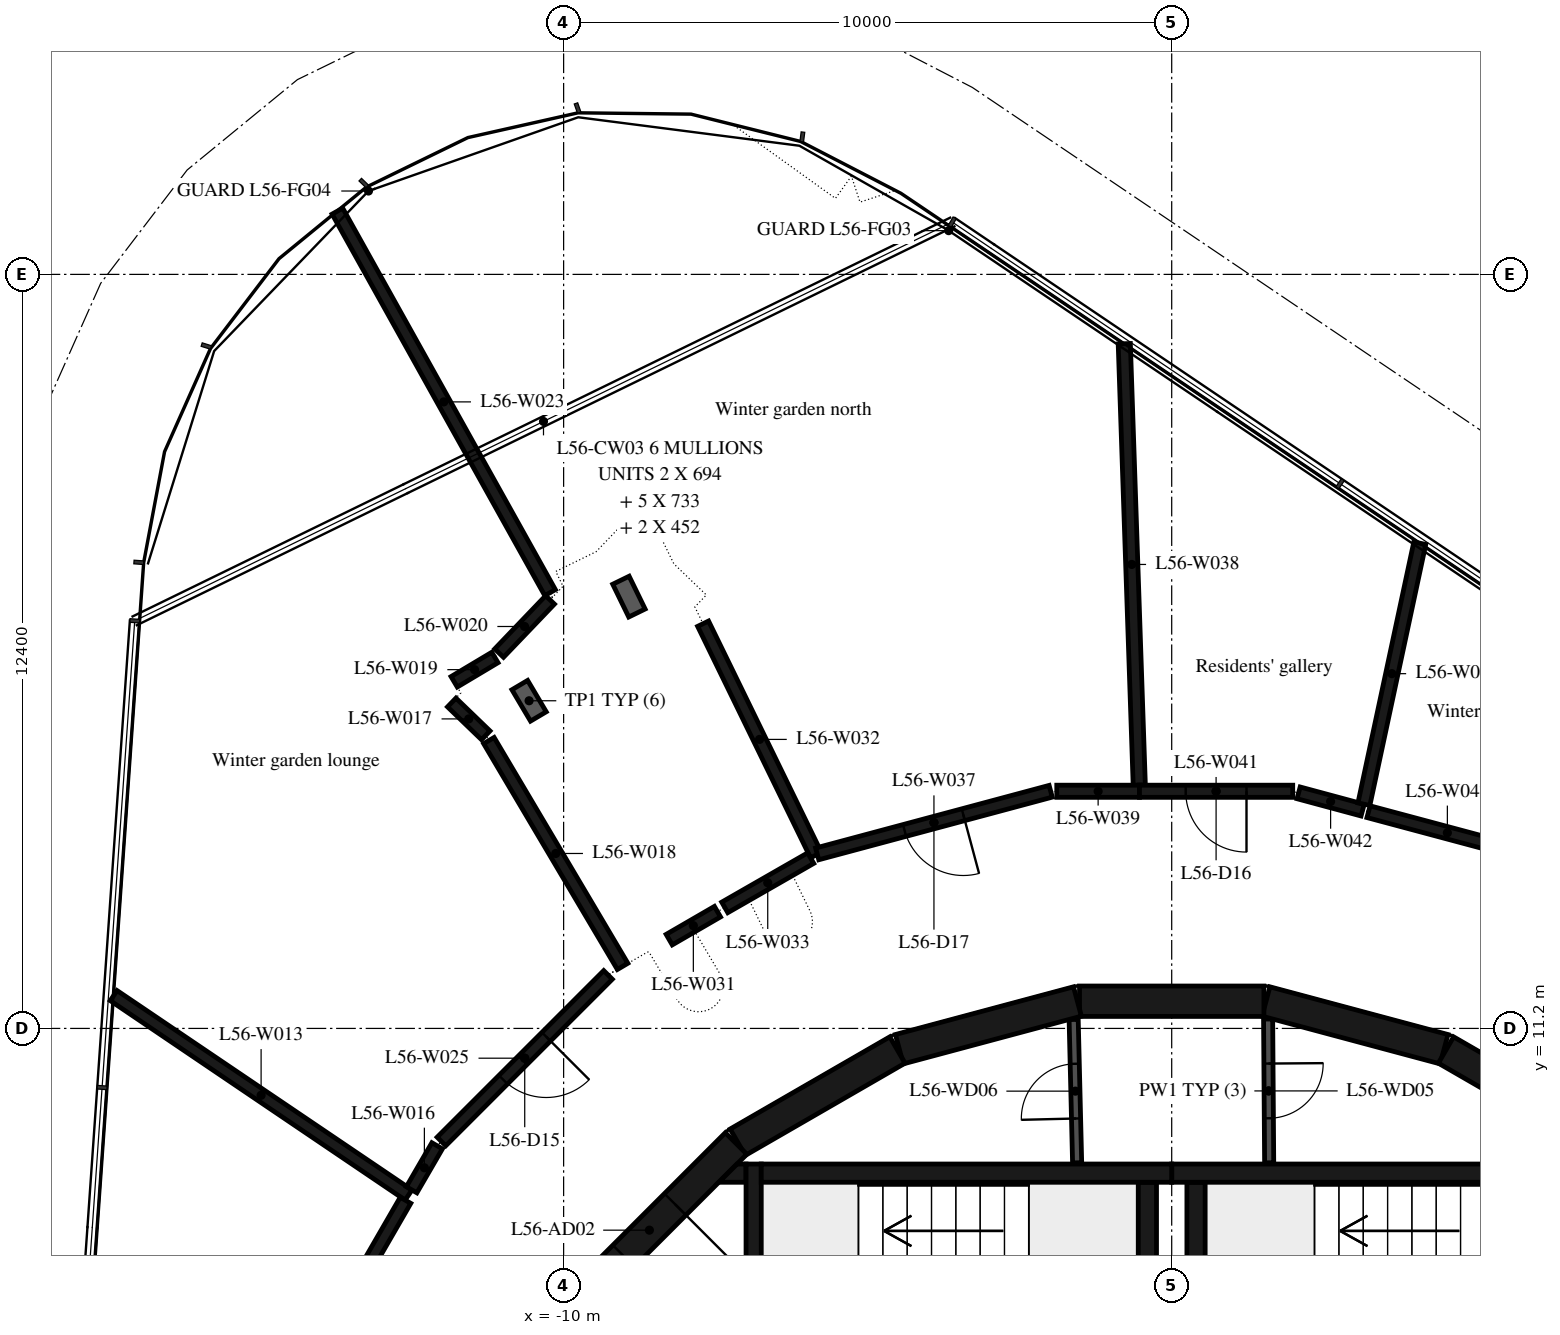
"""IFC4 building model, lengths in metres.
Left out: names, types, materials, properties, quantities, classifications, styles, units other than length and angle.
Written with IfcOpenShell. Run it as: python <this file> out.ifc"""

import sys

from ifc_helpers import new_model, si_unit, direction, frame, frame_2d, origin, place, context, subcontext, project, spatial, polyline, rectangle, outline, extrude, element, fill, save


model = new_model("IFC4")
c1 = context("Model", 3, precision=1e-05, world=origin(), true_north=direction((0.0, 1.0)))
c2 = subcontext(c1, "Body", "Model", "MODEL_VIEW")
j1 = project(units=[si_unit("LENGTHUNIT", "METRE"), si_unit("PLANEANGLEUNIT", "RADIAN")], contexts=[c1])
p1 = place(None, origin())
s1 = spatial("IfcSite", under=j1, at=p1, CompositionType="ELEMENT")
p2 = place(p1, origin())
s2 = spatial("IfcBuilding", under=s1, at=p2, CompositionType="ELEMENT")
p3 = place(p2, frame((0.0, 0.0, 219.9)))
s3 = spatial("IfcBuildingStorey", under=s2, at=p3, CompositionType="ELEMENT", Elevation=219.9)
p4 = place(p3, frame((7.137, 9.329, 0.0), z_axis=(0.0, 0.0, 1.0), x_axis=(-0.865975092491, 0.500087131594, 0.0)))
e1 = element("IfcWall", 1, at=p4, inside=s3, PredefinedType="SHEAR", context=c2, shape_type="SweptSolid", body=[
    extrude(rectangle(XDim=3.033, YDim=0.5, at=frame_2d((1.516, 0.0))), origin(), (0.0, 0.0, 1.0), 6.35),
])
p5 = place(p4, frame((1.066, 0.0, 0.0)))
e2 = element("IfcOpeningElement", 2, at=p5, cuts=e1, PredefinedType="OPENING", context=c2, shape_type="SweptSolid", body=[
    extrude(rectangle(XDim=0.9, YDim=2.1, at=frame_2d((0.45, 1.05))), frame((0.0, 0.26, 0.0), z_axis=(0.0, -1.0, 0.0), x_axis=(1.0, 0.0, 0.0)), (0.0, 0.0, 1.0), 0.52),
])
for number, where, z_axis, x_axis in (
    (3, (4.479, 10.858, 0.0), (0.0, 0.0, 1.0), (-0.966, 0.259, 0.0)),
    (4, (1.516, 11.647, 0.0), (0.0, 0.0, 1.0), (-1.0, 0.0, 0.0)),
    (5, (-1.55, 11.643, 0.0), (0.0, 0.0, 1.0), (-0.966, -0.259, 0.0)),
    (6, (-4.51, 10.845, 0.0), (0.0, 0.0, 1.0), (-0.866, -0.5, 0.0)),
):
    element("IfcWall", number, at=place(p3, frame(where, z_axis=z_axis, x_axis=x_axis)), inside=s3, PredefinedType="SHEAR", context=c2, shape_type="SweptSolid", body=[
        extrude(rectangle(XDim=3.033, YDim=0.5, at=frame_2d((1.516, 0.0))), origin(), (0.0, 0.0, 1.0), 6.35),
    ])
p6 = place(p3, frame((-7.164, 9.308, 0.0), z_axis=(0.0, 0.0, 1.0), x_axis=(-0.707106781187, -0.707106781187, 0.0)))
e7 = element("IfcWall", 7, at=p6, inside=s3, PredefinedType="SHEAR", context=c2, shape_type="SweptSolid", body=[
    extrude(rectangle(XDim=3.032, YDim=0.5, at=frame_2d((1.516, 0.0))), origin(), (0.0, 0.0, 1.0), 6.35),
])
p7 = place(p6, frame((1.416, 0.0, 0.0)))
e8 = element("IfcOpeningElement", 8, at=p7, cuts=e7, PredefinedType="OPENING", context=c2, shape_type="SweptSolid", body=[
    extrude(rectangle(XDim=1.2, YDim=2.1, at=frame_2d((0.6, 1.05))), frame((0.0, 0.26, 0.0), z_axis=(0.0, -1.0, 0.0), x_axis=(1.0, 0.0, 0.0)), (0.0, 0.0, 1.0), 0.52),
])
p8 = place(p3, frame((0.0, 8.82, 0.0), z_axis=(0.0, 0.0, 1.0), x_axis=(1.0, 0.0, 0.0)))
e9 = element("IfcWall", 9, at=p8, inside=s3, PredefinedType="SHEAR", context=c2, shape_type="SweptSolid", body=[
    extrude(rectangle(XDim=6.75, YDim=0.3, at=frame_2d((3.375, 0.0))), origin(), (0.0, 0.0, 1.0), 6.35),
])
p9 = place(p3, frame((0.4, 5.35, 0.0), z_axis=(0.0, 0.0, 1.0), x_axis=(0.0, 1.0, 0.0)))
e10 = element("IfcWall", 10, at=p9, inside=s3, PredefinedType="SHEAR", context=c2, shape_type="SweptSolid", body=[
    extrude(rectangle(XDim=3.32, YDim=0.3, at=frame_2d((1.66, 0.0))), origin(), (0.0, 0.0, 1.0), 6.35),
])
p10 = place(p3, frame((-6.75, 8.82, 0.0), z_axis=(0.0, 0.0, 1.0), x_axis=(1.0, 0.0, 0.0)))
e11 = element("IfcWall", 11, at=p10, inside=s3, PredefinedType="SHEAR", context=c2, shape_type="SweptSolid", body=[
    extrude(rectangle(XDim=6.75, YDim=0.3, at=frame_2d((3.375, 0.0))), origin(), (0.0, 0.0, 1.0), 6.35),
])
p11 = place(p3, frame((-0.4, 5.35, 0.0), z_axis=(0.0, 0.0, 1.0), x_axis=(0.0, 1.0, 0.0)))
e12 = element("IfcWall", 12, at=p11, inside=s3, PredefinedType="SHEAR", context=c2, shape_type="SweptSolid", body=[
    extrude(rectangle(XDim=3.32, YDim=0.3, at=frame_2d((1.66, 0.0))), origin(), (0.0, 0.0, 1.0), 6.35),
])
p12 = place(p3, frame((-6.875, 8.97, 0.0), z_axis=(0.0, 0.0, 1.0), x_axis=(0.0, -1.0, 0.0)))
e13 = element("IfcWall", 13, at=p12, inside=s3, PredefinedType="SHEAR", context=c2, shape_type="SweptSolid", body=[
    extrude(rectangle(XDim=3.92, YDim=0.25, at=frame_2d((1.96, 0.0))), origin(), (0.0, 0.0, 1.0), 6.35),
])
p13 = place(p12, frame((1.61, 0.0, 0.0)))
e14 = element("IfcOpeningElement", 14, at=p13, cuts=e13, PredefinedType="OPENING", context=c2, shape_type="SweptSolid", body=[
    extrude(rectangle(XDim=1.2, YDim=2.1, at=frame_2d((0.6, 1.05))), frame((0.0, 0.135, 0.0), z_axis=(0.0, -1.0, 0.0), x_axis=(1.0, 0.0, 0.0)), (0.0, 0.0, 1.0), 0.27),
])
p14 = place(p3, origin())
e15 = element("IfcWall", 15, at=p14, inside=s3, PredefinedType="SHEAR", context=c2, shape_type="SweptSolid", body=[
    extrude(outline(polyline([(-7.148, 8.97), (-7.0, 8.97), (-7.0, 8.67), (-7.448, 8.67), (-7.148, 8.97)])), origin(), (0.0, 0.0, 1.0), 6.35),
])
p15 = place(p3, frame((1.586, 11.354, 0.0), z_axis=(0.0, 0.0, 1.0), x_axis=(0.007227482881, -0.999973881405, 0.0)))
e16 = element("IfcWall", 16, at=p15, inside=s3, PredefinedType="PARTITIONING", context=c2, shape_type="SweptSolid", body=[
    extrude(rectangle(XDim=2.365, YDim=0.15, at=frame_2d((1.182, 0.0))), origin(), (0.0, 0.0, 1.0), 6.35),
])
p16 = place(p15, frame((0.732, 0.0, 0.0)))
e17 = element("IfcOpeningElement", 17, at=p16, cuts=e16, PredefinedType="OPENING", context=c2, shape_type="SweptSolid", body=[
    extrude(rectangle(XDim=0.9, YDim=2.1, at=frame_2d((0.45, 1.05))), frame((0.0, 0.085, 0.0), z_axis=(0.0, -1.0, 0.0), x_axis=(1.0, 0.0, 0.0)), (0.0, 0.0, 1.0), 0.17),
])
p17 = place(p3, frame((-1.555, 8.99, 0.0), z_axis=(0.0, 0.0, 1.0), x_axis=(-0.024125549686, 0.999708936567, 0.0)))
e18 = element("IfcWall", 18, at=p17, inside=s3, PredefinedType="PARTITIONING", context=c2, shape_type="SweptSolid", body=[
    extrude(rectangle(XDim=2.358, YDim=0.15, at=frame_2d((1.179, 0.0))), origin(), (0.0, 0.0, 1.0), 6.35),
])
p18 = place(p17, frame((0.729, 0.0, 0.0)))
e19 = element("IfcOpeningElement", 19, at=p18, cuts=e18, PredefinedType="OPENING", context=c2, shape_type="SweptSolid", body=[
    extrude(rectangle(XDim=0.9, YDim=2.1, at=frame_2d((0.45, 1.05))), frame((0.0, 0.085, 0.0), z_axis=(0.0, -1.0, 0.0), x_axis=(1.0, 0.0, 0.0)), (0.0, 0.0, 1.0), 0.17),
])
p19 = place(p3, frame((-12.55, 8.46, 0.0), z_axis=(0.0, 0.0, 1.0), x_axis=(-0.82834317232, 0.560221017877, 0.0)))
e20 = element("IfcWall", 20, at=p19, inside=s3, PredefinedType="PARTITIONING", context=c2, shape_type="SweptSolid", body=[
    extrude(rectangle(XDim=5.855, YDim=0.2, at=frame_2d((2.927, 0.0))), origin(), (0.0, 0.0, 1.0), 6.35),
])
p20 = place(p3, frame((-12.6, 8.374, 0.0), z_axis=(0.0, 0.0, 1.0), x_axis=(-0.500357861848, -0.865818693542, 0.0)))
e21 = element("IfcWall", 21, at=p20, inside=s3, PredefinedType="PARTITIONING", context=c2, shape_type="SweptSolid", body=[
    extrude(rectangle(XDim=2.838, YDim=0.2, at=frame_2d((1.419, 0.0))), origin(), (0.0, 0.0, 1.0), 6.35),
])
p21 = place(p3, frame((-12.08, 9.27, 0.0), z_axis=(0.0, 0.0, 1.0), x_axis=(-0.501691883225, -0.865046388528, 0.0)))
e22 = element("IfcWall", 22, at=p21, inside=s3, PredefinedType="PARTITIONING", context=c2, shape_type="SweptSolid", body=[
    extrude(rectangle(XDim=0.836, YDim=0.2, at=frame_2d((0.418, 0.0))), origin(), (0.0, 0.0, 1.0), 6.35),
])
p22 = place(p3, frame((-11.84, 16.56, 0.0), z_axis=(0.0, 0.0, 1.0), x_axis=(0.719855495036, -0.694123955981, 0.0)))
e23 = element("IfcWall", 23, at=p22, inside=s3, PredefinedType="PARTITIONING", context=c2, shape_type="SweptSolid", body=[
    extrude(rectangle(XDim=0.778, YDim=0.2, at=frame_2d((0.389, 0.0))), origin(), (0.0, 0.0, 1.0), 6.35),
])
p23 = place(p3, frame((-11.229, 15.934, 0.0), z_axis=(0.0, 0.0, 1.0), x_axis=(0.509487598, -0.860477999419, 0.0)))
e24 = element("IfcWall", 24, at=p23, inside=s3, PredefinedType="PARTITIONING", context=c2, shape_type="SweptSolid", body=[
    extrude(rectangle(XDim=4.316, YDim=0.2, at=frame_2d((2.158, 0.0))), origin(), (0.0, 0.0, 1.0), 6.35),
])
p24 = place(p3, frame((-11.13, 17.3, 0.0), z_axis=(0.0, 0.0, 1.0), x_axis=(-0.858594898926, -0.51265465914, 0.0)))
e25 = element("IfcWall", 25, at=p24, inside=s3, PredefinedType="PARTITIONING", context=c2, shape_type="SweptSolid", body=[
    extrude(rectangle(XDim=0.781, YDim=0.2, at=frame_2d((0.39, 0.0))), origin(), (0.0, 0.0, 1.0), 6.35),
])
p25 = place(p3, frame((-11.061, 17.372, 0.0), z_axis=(0.0, 0.0, 1.0), x_axis=(0.691515547728, 0.722361576533, 0.0)))
e26 = element("IfcWall", 26, at=p25, inside=s3, PredefinedType="PARTITIONING", context=c2, shape_type="SweptSolid", body=[
    extrude(rectangle(XDim=1.211, YDim=0.2, at=frame_2d((0.605, 0.0))), origin(), (0.0, 0.0, 1.0), 6.35),
])
p26 = place(p3, frame((-10.223, 18.367, 0.0), z_axis=(0.0, 0.0, 1.0), x_axis=(-0.486941161482, 0.87343477447, 0.0)))
e27 = element("IfcWall", 27, at=p26, inside=s3, PredefinedType="PARTITIONING", context=c2, shape_type="SweptSolid", body=[
    extrude(rectangle(XDim=7.182, YDim=0.2, at=frame_2d((3.591, 0.0))), origin(), (0.0, 0.0, 1.0), 6.35),
])
p27 = place(p3, frame((-9.27, 12.08, 0.0), z_axis=(0.0, 0.0, 1.0), x_axis=(-0.707106781187, -0.707106781187, 0.0)))
e28 = element("IfcWall", 28, at=p27, inside=s3, PredefinedType="PARTITIONING", context=c2, shape_type="SweptSolid", body=[
    extrude(rectangle(XDim=3.874, YDim=0.2, at=frame_2d((1.937, 0.0))), origin(), (0.0, 0.0, 1.0), 6.35),
])
p28 = place(p27, frame((1.437, 0.0, 0.0)))
e29 = element("IfcOpeningElement", 29, at=p28, cuts=e28, PredefinedType="OPENING", context=c2, shape_type="SweptSolid", body=[
    extrude(rectangle(XDim=1.0, YDim=2.1, at=frame_2d((0.5, 1.05))), frame((0.0, 0.11, 0.0), z_axis=(0.0, -1.0, 0.0), x_axis=(1.0, 0.0, 0.0)), (0.0, 0.0, 1.0), 0.22),
])
p29 = place(p3, frame((-7.47, 13.12, 0.0), z_axis=(0.0, 0.0, 1.0), x_axis=(-0.865146697165, -0.501518885372, 0.0)))
e30 = element("IfcWall", 30, at=p29, inside=s3, PredefinedType="PARTITIONING", context=c2, shape_type="SweptSolid", body=[
    extrude(rectangle(XDim=0.917, YDim=0.2, at=frame_2d((0.458, 0.0))), origin(), (0.0, 0.0, 1.0), 6.35),
])
p30 = place(p3, frame((-5.85, 14.05, 0.0), z_axis=(0.0, 0.0, 1.0), x_axis=(-0.438381599467, 0.898788948112, 0.0)))
e31 = element("IfcWall", 31, at=p30, inside=s3, PredefinedType="PARTITIONING", context=c2, shape_type="SweptSolid", body=[
    extrude(rectangle(XDim=4.234, YDim=0.2, at=frame_2d((2.117, 0.0))), origin(), (0.0, 0.0, 1.0), 6.35),
])
p31 = place(p3, frame((-5.937, 14.0, 0.0), z_axis=(0.0, 0.0, 1.0), x_axis=(-0.867532153034, -0.49738110484, 0.0)))
e32 = element("IfcWall", 32, at=p31, inside=s3, PredefinedType="PARTITIONING", context=c2, shape_type="SweptSolid", body=[
    extrude(rectangle(XDim=1.629, YDim=0.2, at=frame_2d((0.814, 0.0))), origin(), (0.0, 0.0, 1.0), 6.35),
])
p32 = place(p3, frame((-1.99, 15.1, 0.0), z_axis=(0.0, 0.0, 1.0), x_axis=(-0.965857829358, -0.259072679895, 0.0)))
e33 = element("IfcWall", 33, at=p32, inside=s3, PredefinedType="PARTITIONING", context=c2, shape_type="SweptSolid", body=[
    extrude(rectangle(XDim=3.976, YDim=0.2, at=frame_2d((1.988, 0.0))), origin(), (0.0, 0.0, 1.0), 6.35),
])
p33 = place(p32, frame((1.488, 0.0, 0.0)))
e34 = element("IfcOpeningElement", 34, at=p33, cuts=e33, PredefinedType="OPENING", context=c2, shape_type="SweptSolid", body=[
    extrude(rectangle(XDim=1.0, YDim=2.1, at=frame_2d((0.5, 1.05))), frame((0.0, 0.11, 0.0), z_axis=(0.0, -1.0, 0.0), x_axis=(1.0, 0.0, 0.0)), (0.0, 0.0, 1.0), 0.22),
])
p34 = place(p3, frame((-0.78, 22.46, 0.0), z_axis=(0.0, 0.0, 1.0), x_axis=(0.03394484799, -0.999423707591, 0.0)))
e35 = element("IfcWall", 35, at=p34, inside=s3, PredefinedType="PARTITIONING", context=c2, shape_type="SweptSolid", body=[
    extrude(rectangle(XDim=7.264, YDim=0.2, at=frame_2d((3.632, 0.0))), origin(), (0.0, 0.0, 1.0), 6.35),
])
p35 = place(p3, frame((-0.53, 15.1, 0.0), z_axis=(0.0, 0.0, 1.0), x_axis=(-1.0, 0.0, 0.0)))
e36 = element("IfcWall", 36, at=p35, inside=s3, PredefinedType="PARTITIONING", context=c2, shape_type="SweptSolid", body=[
    extrude(rectangle(XDim=1.36, YDim=0.2, at=frame_2d((0.68, 0.0))), origin(), (0.0, 0.0, 1.0), 6.35),
])
p36 = place(p3, frame((1.99, 15.1, 0.0), z_axis=(0.0, 0.0, 1.0), x_axis=(-1.0, 0.0, 0.0)))
e37 = element("IfcWall", 37, at=p36, inside=s3, PredefinedType="PARTITIONING", context=c2, shape_type="SweptSolid", body=[
    extrude(rectangle(XDim=2.52, YDim=0.2, at=frame_2d((1.26, 0.0))), origin(), (0.0, 0.0, 1.0), 6.35),
])
p37 = place(p36, frame((0.76, 0.0, 0.0)))
e38 = element("IfcOpeningElement", 38, at=p37, cuts=e37, PredefinedType="OPENING", context=c2, shape_type="SweptSolid", body=[
    extrude(rectangle(XDim=1.0, YDim=2.1, at=frame_2d((0.5, 1.05))), frame((0.0, 0.11, 0.0), z_axis=(0.0, -1.0, 0.0), x_axis=(1.0, 0.0, 0.0)), (0.0, 0.0, 1.0), 0.22),
])
p38 = place(p3, frame((3.14, 14.79, 0.0), z_axis=(0.0, 0.0, 1.0), x_axis=(-0.965529267024, 0.260294514963, 0.0)))
e39 = element("IfcWall", 39, at=p38, inside=s3, PredefinedType="PARTITIONING", context=c2, shape_type="SweptSolid", body=[
    extrude(rectangle(XDim=1.091, YDim=0.2, at=frame_2d((0.545, 0.0))), origin(), (0.0, 0.0, 1.0), 6.35),
])
p39 = place(p3, frame((3.161, 14.888, 0.0), z_axis=(0.0, 0.0, 1.0), x_axis=(0.209403741848, 0.977829265721, 0.0)))
e40 = element("IfcWall", 40, at=p39, inside=s3, PredefinedType="PARTITIONING", context=c2, shape_type="SweptSolid", body=[
    extrude(rectangle(XDim=4.39, YDim=0.2, at=frame_2d((2.195, 0.0))), origin(), (0.0, 0.0, 1.0), 6.35),
])
p40 = place(p3, frame((5.83, 14.07, 0.0), z_axis=(0.0, 0.0, 1.0), x_axis=(-0.966003629213, 0.25852850587, 0.0)))
e41 = element("IfcWall", 41, at=p40, inside=s3, PredefinedType="PARTITIONING", context=c2, shape_type="SweptSolid", body=[
    extrude(rectangle(XDim=2.685, YDim=0.2, at=frame_2d((1.342, 0.0))), origin(), (0.0, 0.0, 1.0), 6.35),
])
p41 = place(p7, origin())
e42 = element("IfcDoor", 42, at=p41, inside=s3, OperationType="SINGLE_SWING_RIGHT", PredefinedType="DOOR", context=c2, shape_type="SweptSolid", body=[
    extrude(rectangle(XDim=1.2, YDim=2.1, at=frame_2d((0.6, 1.05))), frame((0.0, 0.025, 0.0), z_axis=(0.0, -1.0, 0.0), x_axis=(1.0, 0.0, 0.0)), (0.0, 0.0, 1.0), 0.05),
])
fill(e8, e42)
p42 = place(p16, origin())
e43 = element("IfcDoor", 43, at=p42, inside=s3, OperationType="SINGLE_SWING_LEFT", PredefinedType="DOOR", context=c2, shape_type="SweptSolid", body=[
    extrude(rectangle(XDim=0.9, YDim=2.1, at=frame_2d((0.45, 1.05))), frame((0.0, 0.025, 0.0), z_axis=(0.0, -1.0, 0.0), x_axis=(1.0, 0.0, 0.0)), (0.0, 0.0, 1.0), 0.05),
])
fill(e17, e43)
p43 = place(p18, origin())
e44 = element("IfcDoor", 44, at=p43, inside=s3, OperationType="SINGLE_SWING_RIGHT", PredefinedType="DOOR", context=c2, shape_type="SweptSolid", body=[
    extrude(rectangle(XDim=0.9, YDim=2.1, at=frame_2d((0.45, 1.05))), frame((0.0, 0.025, 0.0), z_axis=(0.0, -1.0, 0.0), x_axis=(1.0, 0.0, 0.0)), (0.0, 0.0, 1.0), 0.05),
])
fill(e19, e44)
p44 = place(p28, origin())
e45 = element("IfcDoor", 45, at=p44, inside=s3, OperationType="SINGLE_SWING_LEFT", PredefinedType="DOOR", context=c2, shape_type="SweptSolid", body=[
    extrude(rectangle(XDim=1.0, YDim=2.1, at=frame_2d((0.5, 1.05))), frame((0.0, 0.025, 0.0), z_axis=(0.0, -1.0, 0.0), x_axis=(1.0, 0.0, 0.0)), (0.0, 0.0, 1.0), 0.05),
])
fill(e29, e45)
p45 = place(p37, origin())
e46 = element("IfcDoor", 46, at=p45, inside=s3, OperationType="SINGLE_SWING_LEFT", PredefinedType="DOOR", context=c2, shape_type="SweptSolid", body=[
    extrude(rectangle(XDim=1.0, YDim=2.1, at=frame_2d((0.5, 1.05))), frame((0.0, 0.025, 0.0), z_axis=(0.0, -1.0, 0.0), x_axis=(1.0, 0.0, 0.0)), (0.0, 0.0, 1.0), 0.05),
])
fill(e38, e46)
p46 = place(p33, origin())
e47 = element("IfcDoor", 47, at=p46, inside=s3, OperationType="SINGLE_SWING_LEFT", PredefinedType="DOOR", context=c2, shape_type="SweptSolid", body=[
    extrude(rectangle(XDim=1.0, YDim=2.1, at=frame_2d((0.5, 1.05))), frame((0.0, 0.025, 0.0), z_axis=(0.0, -1.0, 0.0), x_axis=(1.0, 0.0, 0.0)), (0.0, 0.0, 1.0), 0.05),
])
fill(e34, e47)
save(model, sys.argv[1])
